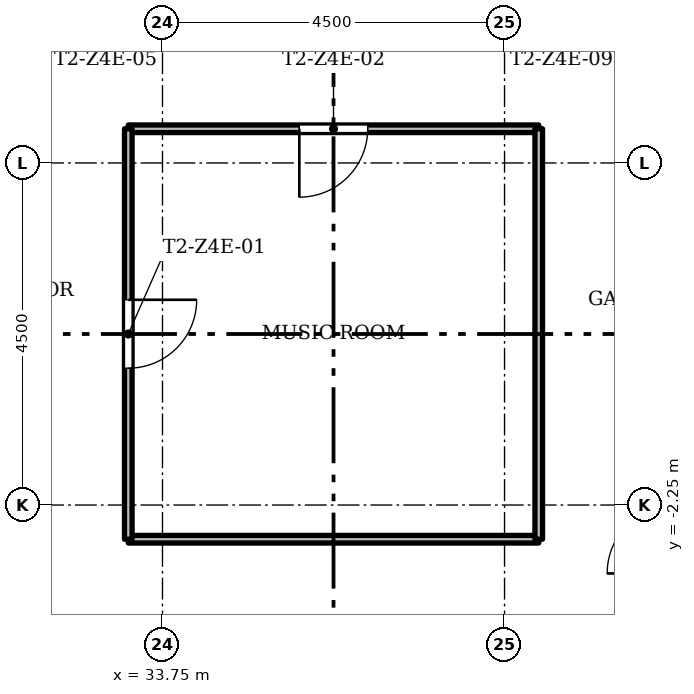
"""IFC4 building model, lengths in metres.
Left out: names, types, materials, properties, quantities, classifications, styles, units other than length and angle.
Written with IfcOpenShell. Run it as: python <this file> out.ifc"""

import sys

from ifc_helpers import new_model, si_unit, direction, frame, frame_2d, origin, place, context, subcontext, project, spatial, rectangle, extrude, element, fill, save


model = new_model("IFC4")
c1 = context("Model", 3, precision=1e-05, world=origin(), true_north=direction((0.0, 1.0)))
c2 = subcontext(c1, "Body", "Model", "MODEL_VIEW")
j1 = project(units=[si_unit("LENGTHUNIT", "METRE"), si_unit("PLANEANGLEUNIT", "RADIAN")], contexts=[c1])
p1 = place(None, origin())
s1 = spatial("IfcSite", under=j1, at=p1, CompositionType="ELEMENT")
p2 = place(p1, origin())
s2 = spatial("IfcBuilding", under=s1, at=p2, CompositionType="ELEMENT")
p3 = place(p2, frame((0.0, 0.0, 213.0)))
s3 = spatial("IfcBuildingStorey", under=s2, at=p3, CompositionType="ELEMENT", Elevation=213.0)
p4 = place(p3, frame((38.7, -2.7, 0.0), z_axis=(0.0, 0.0, 1.0), x_axis=(-1.0, 0.0, 0.0)))
e1 = element("IfcWall", 1, at=p4, inside=s3, PredefinedType="PARTITIONING", context=c2, shape_type="SweptSolid", body=[
    extrude(rectangle(XDim=5.4, YDim=0.1, at=frame_2d((2.7, 0.0))), origin(), (0.0, 0.0, 1.0), 3.0),
])
p5 = place(p3, frame((38.7, 2.7, 0.0), z_axis=(0.0, 0.0, 1.0), x_axis=(-1.0, 0.0, 0.0)))
e2 = element("IfcWall", 2, at=p5, inside=s3, PredefinedType="PARTITIONING", context=c2, shape_type="SweptSolid", body=[
    extrude(rectangle(XDim=5.4, YDim=0.1, at=frame_2d((2.7, 0.0))), origin(), (0.0, 0.0, 1.0), 3.0),
])
p6 = place(p5, frame((2.25, 0.0, 0.0)))
e3 = element("IfcOpeningElement", 3, at=p6, cuts=e2, PredefinedType="OPENING", context=c2, shape_type="SweptSolid", body=[
    extrude(rectangle(XDim=0.9, YDim=2.1, at=frame_2d((0.45, 1.05))), frame((0.0, 0.06, 0.0), z_axis=(0.0, -1.0, 0.0), x_axis=(1.0, 0.0, 0.0)), (0.0, 0.0, 1.0), 0.12),
])
p7 = place(p3, frame((38.7, -2.7, 0.0), z_axis=(0.0, 0.0, 1.0), x_axis=(0.0, 1.0, 0.0)))
e4 = element("IfcWall", 4, at=p7, inside=s3, PredefinedType="PARTITIONING", context=c2, shape_type="SweptSolid", body=[
    extrude(rectangle(XDim=5.4, YDim=0.1, at=frame_2d((2.7, 0.0))), origin(), (0.0, 0.0, 1.0), 3.0),
])
p8 = place(p3, frame((33.3, -2.7, 0.0), z_axis=(0.0, 0.0, 1.0), x_axis=(0.0, 1.0, 0.0)))
e5 = element("IfcWall", 5, at=p8, inside=s3, PredefinedType="PARTITIONING", context=c2, shape_type="SweptSolid", body=[
    extrude(rectangle(XDim=5.4, YDim=0.1, at=frame_2d((2.7, 0.0))), origin(), (0.0, 0.0, 1.0), 3.0),
])
p9 = place(p8, frame((2.25, 0.0, 0.0)))
e6 = element("IfcOpeningElement", 6, at=p9, cuts=e5, PredefinedType="OPENING", context=c2, shape_type="SweptSolid", body=[
    extrude(rectangle(XDim=0.9, YDim=2.1, at=frame_2d((0.45, 1.05))), frame((0.0, 0.06, 0.0), z_axis=(0.0, -1.0, 0.0), x_axis=(1.0, 0.0, 0.0)), (0.0, 0.0, 1.0), 0.12),
])
p10 = place(p9, origin())
e7 = element("IfcDoor", 7, at=p10, inside=s3, OperationType="SINGLE_SWING_RIGHT", PredefinedType="DOOR", context=c2, shape_type="SweptSolid", body=[
    extrude(rectangle(XDim=0.9, YDim=2.1, at=frame_2d((0.45, 1.05))), frame((0.0, 0.025, 0.0), z_axis=(0.0, -1.0, 0.0), x_axis=(1.0, 0.0, 0.0)), (0.0, 0.0, 1.0), 0.05),
])
fill(e6, e7)
p11 = place(p6, origin())
e8 = element("IfcDoor", 8, at=p11, inside=s3, OperationType="SINGLE_SWING_LEFT", PredefinedType="DOOR", context=c2, shape_type="SweptSolid", body=[
    extrude(rectangle(XDim=0.9, YDim=2.1, at=frame_2d((0.45, 1.05))), frame((0.0, 0.025, 0.0), z_axis=(0.0, -1.0, 0.0), x_axis=(1.0, 0.0, 0.0)), (0.0, 0.0, 1.0), 0.05),
])
fill(e3, e8)
save(model, sys.argv[1])
